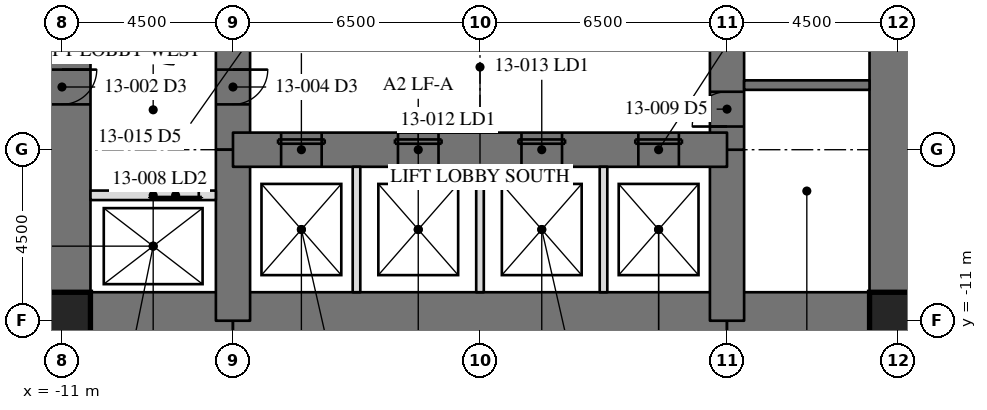
"""IFC4 building model, lengths in metres.
Left out: names, types, materials, properties, quantities, classifications, styles, units other than length and angle.
Written with IfcOpenShell. Run it as: python <this file> out.ifc"""

import sys

from ifc_helpers import new_model, si_unit, direction, frame, frame_2d, origin, origin_2d, place, context, subcontext, project, spatial, rectangle, hollow_rectangle, extrude, element, fill, save


model = new_model("IFC4")
c1 = context("Model", 3, precision=1e-05, world=origin(), true_north=direction((0.0, 1.0)))
c2 = subcontext(c1, "Body", "Model", "MODEL_VIEW")
j1 = project(units=[si_unit("LENGTHUNIT", "METRE"), si_unit("PLANEANGLEUNIT", "RADIAN")], contexts=[c1])
p1 = place(None, origin())
s1 = spatial("IfcSite", under=j1, at=p1, CompositionType="ELEMENT")
p2 = place(p1, origin())
s2 = spatial("IfcBuilding", under=s1, at=p2, CompositionType="ELEMENT")
p3 = place(p2, frame((0.0, 0.0, 57.0)))
s3 = spatial("IfcBuildingStorey", under=s2, at=p3, CompositionType="ELEMENT", Elevation=57.0)
p4 = place(p3, frame((11.0, -11.0, 0.0), z_axis=(0.0, 0.0, 1.0), x_axis=(0.0, 1.0, 0.0)))
e1 = element("IfcWall", 1, at=p4, inside=s3, PredefinedType="SHEAR", context=c2, shape_type="SweptSolid", body=[
    extrude(rectangle(XDim=22.0, YDim=1.5, at=frame_2d((11.0, 0.0))), origin(), (0.0, 0.0, 1.0), 4.1),
])
p5 = place(p4, frame((15.393, 0.0, 0.0)))
e2 = element("IfcOpeningElement", 2, at=p5, cuts=e1, PredefinedType="OPENING", context=c2, shape_type="SweptSolid", body=[
    extrude(rectangle(XDim=0.915, YDim=2.134, at=frame_2d((0.458, 1.067))), frame((0.0, 0.76, 0.0), z_axis=(0.0, -1.0, 0.0), x_axis=(1.0, 0.0, 0.0)), (0.0, 0.0, 1.0), 1.52),
])
p6 = place(p3, frame((-11.0, 11.0, 0.0), z_axis=(0.0, 0.0, 1.0), x_axis=(0.0, -1.0, 0.0)))
e3 = element("IfcWall", 3, at=p6, inside=s3, PredefinedType="SHEAR", context=c2, shape_type="SweptSolid", body=[
    extrude(rectangle(XDim=22.0, YDim=1.5, at=frame_2d((11.0, 0.0))), origin(), (0.0, 0.0, 1.0), 4.1),
])
p7 = place(p6, frame((15.393, 0.0, 0.0)))
e4 = element("IfcOpeningElement", 4, at=p7, cuts=e3, PredefinedType="OPENING", context=c2, shape_type="SweptSolid", body=[
    extrude(rectangle(XDim=0.915, YDim=2.134, at=frame_2d((0.458, 1.067))), frame((0.0, 0.76, 0.0), z_axis=(0.0, -1.0, 0.0), x_axis=(1.0, 0.0, 0.0)), (0.0, 0.0, 1.0), 1.52),
])
p8 = place(p3, frame((-11.0, -11.0, 0.0), z_axis=(0.0, 0.0, 1.0), x_axis=(1.0, 0.0, 0.0)))
e5 = element("IfcWall", 5, at=p8, inside=s3, PredefinedType="SHEAR", context=c2, shape_type="SweptSolid", body=[
    extrude(rectangle(XDim=4.5, YDim=1.5, at=frame_2d((2.25, 0.0))), origin(), (0.0, 0.0, 1.0), 4.1),
])
p9 = place(p3, frame((-6.5, -11.0, 0.0), z_axis=(0.0, 0.0, 1.0), x_axis=(1.0, 0.0, 0.0)))
e6 = element("IfcWall", 6, at=p9, inside=s3, PredefinedType="SHEAR", context=c2, shape_type="SweptSolid", body=[
    extrude(rectangle(XDim=13.0, YDim=1.5, at=frame_2d((6.5, 0.0))), origin(), (0.0, 0.0, 1.0), 4.1),
])
p10 = place(p3, frame((6.5, -11.0, 0.0), z_axis=(0.0, 0.0, 1.0), x_axis=(1.0, 0.0, 0.0)))
e7 = element("IfcWall", 7, at=p10, inside=s3, PredefinedType="SHEAR", context=c2, shape_type="SweptSolid", body=[
    extrude(rectangle(XDim=4.5, YDim=1.5, at=frame_2d((2.25, 0.0))), origin(), (0.0, 0.0, 1.0), 4.1),
])
p11 = place(p3, frame((6.5, -11.0, 0.0), z_axis=(0.0, 0.0, 1.0), x_axis=(0.0, 1.0, 0.0)))
e8 = element("IfcWall", 8, at=p11, inside=s3, PredefinedType="SHEAR", context=c2, shape_type="SweptSolid", body=[
    extrude(rectangle(XDim=4.5, YDim=0.9, at=frame_2d((2.25, 0.0))), origin(), (0.0, 0.0, 1.0), 4.1),
])
p12 = place(p3, frame((6.5, -6.5, 0.0), z_axis=(0.0, 0.0, 1.0), x_axis=(0.0, 1.0, 0.0)))
e9 = element("IfcWall", 9, at=p12, inside=s3, PredefinedType="SHEAR", context=c2, shape_type="SweptSolid", body=[
    extrude(rectangle(XDim=13.0, YDim=0.9, at=frame_2d((6.5, 0.0))), origin(), (0.0, 0.0, 1.0), 4.1),
])
p13 = place(p12, frame((10.893, 0.0, 0.0)))
e10 = element("IfcOpeningElement", 10, at=p13, cuts=e9, PredefinedType="OPENING", context=c2, shape_type="SweptSolid", body=[
    extrude(rectangle(XDim=0.915, YDim=2.134, at=frame_2d((0.458, 1.067))), frame((0.0, 0.46, 0.0), z_axis=(0.0, -1.0, 0.0), x_axis=(1.0, 0.0, 0.0)), (0.0, 0.0, 1.0), 0.92),
])
p14 = place(p12, frame((0.61, 0.0, 0.0)))
e11 = element("IfcOpeningElement", 11, at=p14, cuts=e9, PredefinedType="OPENING", context=c2, shape_type="SweptSolid", body=[
    extrude(rectangle(XDim=0.915, YDim=2.134, at=frame_2d((0.458, 1.067))), frame((0.0, 0.46, 0.0), z_axis=(0.0, -1.0, 0.0), x_axis=(1.0, 0.0, 0.0)), (0.0, 0.0, 1.0), 0.92),
])
p15 = place(p3, frame((-6.5, 6.5, 0.0), z_axis=(0.0, 0.0, 1.0), x_axis=(0.0, -1.0, 0.0)))
e12 = element("IfcWall", 12, at=p15, inside=s3, PredefinedType="SHEAR", context=c2, shape_type="SweptSolid", body=[
    extrude(rectangle(XDim=13.0, YDim=0.9, at=frame_2d((6.5, 0.0))), origin(), (0.0, 0.0, 1.0), 4.1),
])
p16 = place(p15, frame((10.893, 0.0, 0.0)))
e13 = element("IfcOpeningElement", 13, at=p16, cuts=e12, PredefinedType="OPENING", context=c2, shape_type="SweptSolid", body=[
    extrude(rectangle(XDim=0.915, YDim=2.134, at=frame_2d((0.458, 1.067))), frame((0.0, 0.46, 0.0), z_axis=(0.0, -1.0, 0.0), x_axis=(1.0, 0.0, 0.0)), (0.0, 0.0, 1.0), 0.92),
])
p17 = place(p15, frame((0.61, 0.0, 0.0)))
e14 = element("IfcOpeningElement", 14, at=p17, cuts=e12, PredefinedType="OPENING", context=c2, shape_type="SweptSolid", body=[
    extrude(rectangle(XDim=0.915, YDim=2.134, at=frame_2d((0.458, 1.067))), frame((0.0, 0.46, 0.0), z_axis=(0.0, -1.0, 0.0), x_axis=(1.0, 0.0, 0.0)), (0.0, 0.0, 1.0), 0.92),
])
p18 = place(p3, frame((-6.5, -6.5, 0.0), z_axis=(0.0, 0.0, 1.0), x_axis=(0.0, -1.0, 0.0)))
e15 = element("IfcWall", 15, at=p18, inside=s3, PredefinedType="SHEAR", context=c2, shape_type="SweptSolid", body=[
    extrude(rectangle(XDim=4.5, YDim=0.9, at=frame_2d((2.25, 0.0))), origin(), (0.0, 0.0, 1.0), 4.1),
])
p19 = place(p3, frame((-6.5, -6.5, 0.0), z_axis=(0.0, 0.0, 1.0), x_axis=(1.0, 0.0, 0.0)))
e16 = element("IfcWall", 16, at=p19, inside=s3, PredefinedType="SHEAR", context=c2, shape_type="SweptSolid", body=[
    extrude(rectangle(XDim=13.0, YDim=0.9, at=frame_2d((6.5, 0.0))), origin(), (0.0, 0.0, 1.0), 4.1),
])
p20 = place(p19, frame((1.267, 0.0, 0.0)))
e17 = element("IfcOpeningElement", 17, at=p20, cuts=e16, PredefinedType="OPENING", context=c2, shape_type="SweptSolid", body=[
    extrude(rectangle(XDim=1.067, YDim=2.134, at=frame_2d((0.533, 1.067))), frame((0.0, 0.46, 0.0), z_axis=(0.0, -1.0, 0.0), x_axis=(1.0, 0.0, 0.0)), (0.0, 0.0, 1.0), 0.92),
])
p21 = place(p19, frame((4.342, 0.0, 0.0)))
e18 = element("IfcOpeningElement", 18, at=p21, cuts=e16, PredefinedType="OPENING", context=c2, shape_type="SweptSolid", body=[
    extrude(rectangle(XDim=1.067, YDim=2.134, at=frame_2d((0.533, 1.067))), frame((0.0, 0.46, 0.0), z_axis=(0.0, -1.0, 0.0), x_axis=(1.0, 0.0, 0.0)), (0.0, 0.0, 1.0), 0.92),
])
p22 = place(p19, frame((7.592, 0.0, 0.0)))
e19 = element("IfcOpeningElement", 19, at=p22, cuts=e16, PredefinedType="OPENING", context=c2, shape_type="SweptSolid", body=[
    extrude(rectangle(XDim=1.067, YDim=2.134, at=frame_2d((0.533, 1.067))), frame((0.0, 0.46, 0.0), z_axis=(0.0, -1.0, 0.0), x_axis=(1.0, 0.0, 0.0)), (0.0, 0.0, 1.0), 0.92),
])
p23 = place(p19, frame((10.667, 0.0, 0.0)))
e20 = element("IfcOpeningElement", 20, at=p23, cuts=e16, PredefinedType="OPENING", context=c2, shape_type="SweptSolid", body=[
    extrude(rectangle(XDim=1.067, YDim=2.134, at=frame_2d((0.533, 1.067))), frame((0.0, 0.46, 0.0), z_axis=(0.0, -1.0, 0.0), x_axis=(1.0, 0.0, 0.0)), (0.0, 0.0, 1.0), 0.92),
])
for number, where, z_axis, x_axis in (
    (21, (-11.0, -11.0, 0.0), (0.0, 0.0, 1.0), (1.0, 0.0, 0.0)),
    (22, (11.0, -11.0, 0.0), (0.0, 0.0, 1.0), (1.0, 0.0, 0.0)),
):
    element("IfcColumn", number, at=place(p3, frame(where, z_axis=z_axis, x_axis=x_axis)), inside=s3, PredefinedType="COLUMN", context=c2, shape_type="SweptSolid", body=[
        extrude(hollow_rectangle(XDim=1.499, YDim=1.499, WallThickness=0.102, at=origin_2d()), origin(), (0.0, 0.0, 1.0), 4.1),
    ])
p24 = place(p3, frame((6.95, -4.8, 0.0), z_axis=(0.0, 0.0, 1.0), x_axis=(1.0, 0.0, 0.0)))
e23 = element("IfcWall", 23, at=p24, inside=s3, PredefinedType="SOLIDWALL", context=c2, shape_type="SweptSolid", body=[
    extrude(rectangle(XDim=3.3, YDim=0.25, at=frame_2d((1.65, 0.0))), origin(), (0.0, 0.0, 1.0), 3.91),
])
p25 = place(p3, frame((-6.95, -7.7, 0.0), z_axis=(0.0, 0.0, 1.0), x_axis=(-1.0, 0.0, 0.0)))
e24 = element("IfcWall", 24, at=p25, inside=s3, PredefinedType="PARTITIONING", context=c2, shape_type="SweptSolid", body=[
    extrude(rectangle(XDim=3.3, YDim=0.25, at=frame_2d((1.65, 0.0))), origin(), (0.0, 0.0, 1.0), 3.91),
])
p26 = place(p25, frame((0.45, 0.0, 0.0)))
e25 = element("IfcOpeningElement", 25, at=p26, cuts=e24, PredefinedType="OPENING", context=c2, shape_type="SweptSolid", body=[
    extrude(rectangle(XDim=1.219, YDim=2.134, at=frame_2d((0.609, 1.067))), frame((0.0, 0.135, 0.0), z_axis=(0.0, -1.0, 0.0), x_axis=(1.0, 0.0, 0.0)), (0.0, 0.0, 1.0), 0.27),
])
for number, where, z_axis, x_axis in (
    (26, (-3.25, -10.25, 0.0), (0.0, 0.0, 1.0), (0.0, 1.0, 0.0)),
    (27, (0.0, -10.25, 0.0), (0.0, 0.0, 1.0), (0.0, 1.0, 0.0)),
    (28, (3.25, -10.25, 0.0), (0.0, 0.0, 1.0), (0.0, 1.0, 0.0)),
):
    element("IfcWall", number, at=place(p3, frame(where, z_axis=z_axis, x_axis=x_axis)), inside=s3, PredefinedType="PARTITIONING", context=c2, shape_type="SweptSolid", body=[
        extrude(rectangle(XDim=3.3, YDim=0.2, at=frame_2d((1.65, 0.0))), origin(), (0.0, 0.0, 1.0), 3.91),
    ])
p27 = place(p16, origin())
e29 = element("IfcDoor", 29, at=p27, inside=s3, OperationType="SINGLE_SWING_RIGHT", PredefinedType="DOOR", context=c2, shape_type="SweptSolid", body=[
    extrude(rectangle(XDim=0.915, YDim=2.134, at=frame_2d((0.458, 1.067))), frame((0.0, -0.375, 0.0), z_axis=(0.0, -1.0, 0.0), x_axis=(1.0, 0.0, 0.0)), (0.0, 0.0, 1.0), 0.05),
])
fill(e13, e29)
p28 = place(p26, origin())
e30 = element("IfcDoor", 30, at=p28, inside=s3, OperationType="SLIDING_TO_LEFT", PredefinedType="DOOR", context=c2, shape_type="SweptSolid", body=[
    extrude(rectangle(XDim=1.219, YDim=2.134, at=frame_2d((0.609, 1.067))), frame((0.0, 0.025, 0.0), z_axis=(0.0, -1.0, 0.0), x_axis=(1.0, 0.0, 0.0)), (0.0, 0.0, 1.0), 0.05),
])
fill(e25, e30)
p29 = place(p14, origin())
e31 = element("IfcDoor", 31, at=p29, inside=s3, OperationType="SINGLE_SWING_RIGHT", PredefinedType="DOOR", context=c2, shape_type="SweptSolid", body=[
    extrude(rectangle(XDim=0.915, YDim=2.134, at=frame_2d((0.458, 1.067))), frame((0.0, -0.375, 0.0), z_axis=(0.0, -1.0, 0.0), x_axis=(1.0, 0.0, 0.0)), (0.0, 0.0, 1.0), 0.05),
])
fill(e11, e31)
p30 = place(p20, origin())
e32 = element("IfcDoor", 32, at=p30, inside=s3, OperationType="SLIDING_TO_LEFT", PredefinedType="DOOR", context=c2, shape_type="SweptSolid", body=[
    extrude(rectangle(XDim=1.067, YDim=2.134, at=frame_2d((0.533, 1.067))), frame((0.0, -0.375, 0.0), z_axis=(0.0, -1.0, 0.0), x_axis=(1.0, 0.0, 0.0)), (0.0, 0.0, 1.0), 0.05),
])
fill(e17, e32)
p31 = place(p21, origin())
e33 = element("IfcDoor", 33, at=p31, inside=s3, OperationType="SLIDING_TO_LEFT", PredefinedType="DOOR", context=c2, shape_type="SweptSolid", body=[
    extrude(rectangle(XDim=1.067, YDim=2.134, at=frame_2d((0.533, 1.067))), frame((0.0, -0.375, 0.0), z_axis=(0.0, -1.0, 0.0), x_axis=(1.0, 0.0, 0.0)), (0.0, 0.0, 1.0), 0.05),
])
fill(e18, e33)
p32 = place(p22, origin())
e34 = element("IfcDoor", 34, at=p32, inside=s3, OperationType="SLIDING_TO_LEFT", PredefinedType="DOOR", context=c2, shape_type="SweptSolid", body=[
    extrude(rectangle(XDim=1.067, YDim=2.134, at=frame_2d((0.533, 1.067))), frame((0.0, -0.375, 0.0), z_axis=(0.0, -1.0, 0.0), x_axis=(1.0, 0.0, 0.0)), (0.0, 0.0, 1.0), 0.05),
])
fill(e19, e34)
p33 = place(p23, origin())
e35 = element("IfcDoor", 35, at=p33, inside=s3, OperationType="SLIDING_TO_LEFT", PredefinedType="DOOR", context=c2, shape_type="SweptSolid", body=[
    extrude(rectangle(XDim=1.067, YDim=2.134, at=frame_2d((0.533, 1.067))), frame((0.0, -0.375, 0.0), z_axis=(0.0, -1.0, 0.0), x_axis=(1.0, 0.0, 0.0)), (0.0, 0.0, 1.0), 0.05),
])
fill(e20, e35)
save(model, sys.argv[1])
